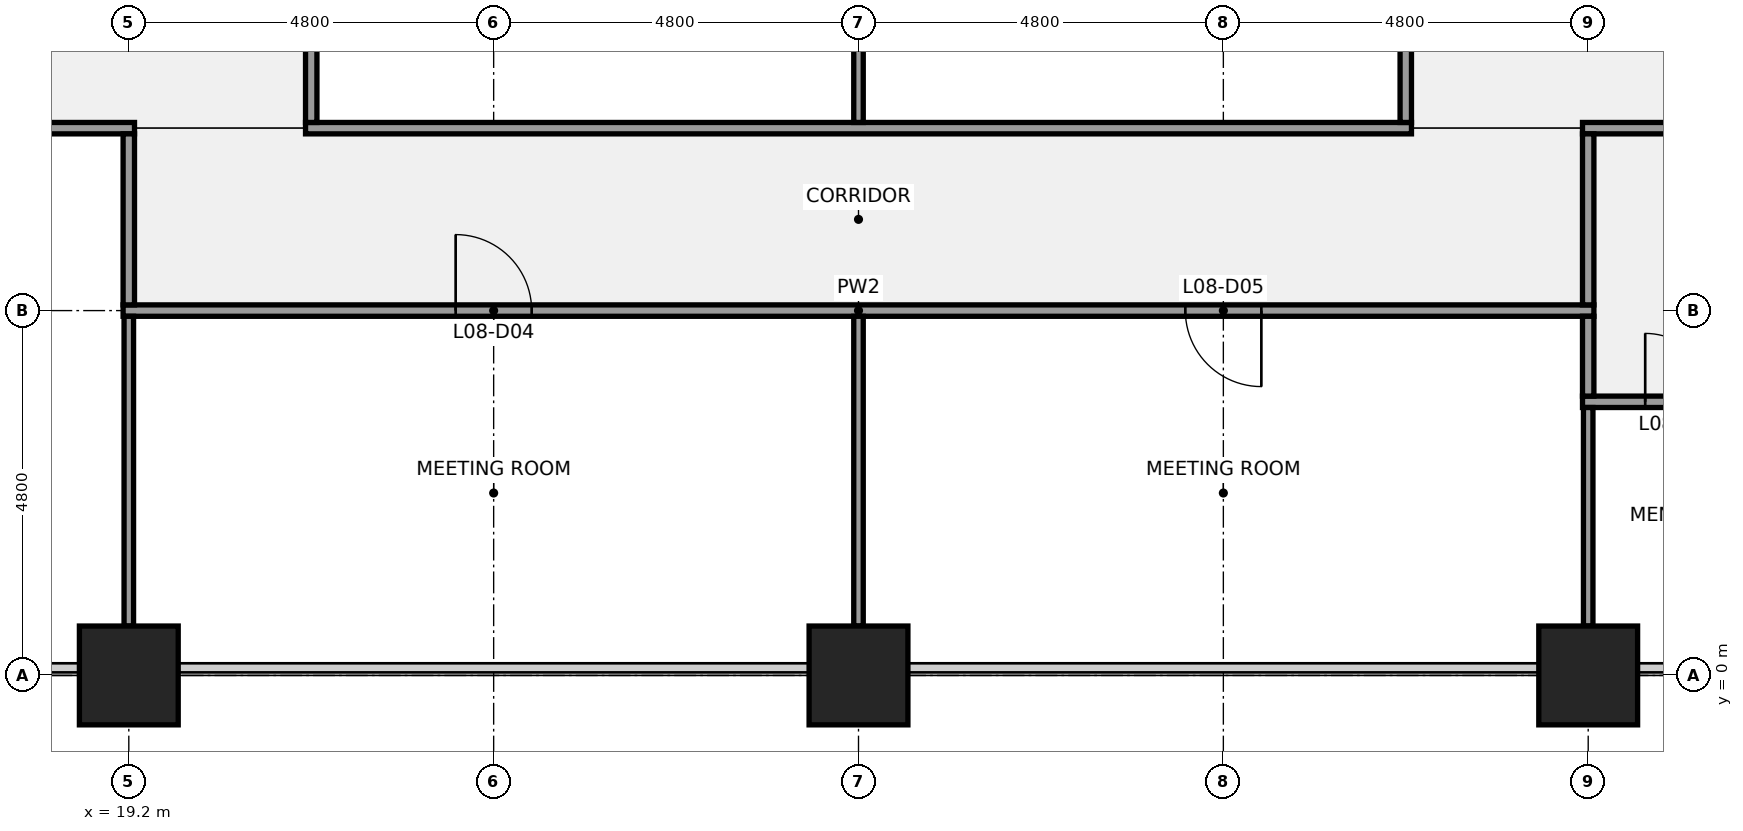
"""IFC4 building model, lengths in metres.
Left out: names, types, materials, properties, quantities, classifications, styles, units other than length and angle.
Written with IfcOpenShell. Run it as: python <this file> out.ifc"""

import sys

from ifc_helpers import new_model, si_unit, direction, frame, frame_2d, origin, origin_2d, place, context, subcontext, project, spatial, rectangle, extrude, element, fill, save


model = new_model("IFC4")
c1 = context("Model", 3, precision=1e-05, world=origin(), true_north=direction((0.0, 1.0)))
c2 = subcontext(c1, "Body", "Model", "MODEL_VIEW")
j1 = project(units=[si_unit("LENGTHUNIT", "METRE"), si_unit("PLANEANGLEUNIT", "RADIAN")], contexts=[c1])
p1 = place(None, origin())
s1 = spatial("IfcSite", under=j1, at=p1, CompositionType="ELEMENT")
p2 = place(p1, origin())
s2 = spatial("IfcBuilding", under=s1, at=p2, CompositionType="ELEMENT")
p3 = place(p2, frame((0.0, 0.0, 43.0)))
s3 = spatial("IfcBuildingStorey", under=s2, at=p3, CompositionType="ELEMENT", Elevation=43.0)
for number, where, z_axis, x_axis in (
    (1, (19.2, 0.0, 0.0), (0.0, 0.0, 1.0), (1.0, 0.0, 0.0)),
    (2, (28.8, 0.0, 0.0), (0.0, 0.0, 1.0), (1.0, 0.0, 0.0)),
    (3, (38.4, 0.0, 0.0), (0.0, 0.0, 1.0), (1.0, 0.0, 0.0)),
):
    element("IfcColumn", number, at=place(p3, frame(where, z_axis=z_axis, x_axis=x_axis)), inside=s3, PredefinedType="COLUMN", context=c2, shape_type="SweptSolid", body=[
        extrude(rectangle(XDim=1.3, YDim=1.3, at=origin_2d()), origin(), (0.0, 0.0, 1.0), 4.0),
    ])
p4 = place(p3, frame((38.325, 3.6, 0.0), z_axis=(0.0, 0.0, 1.0), x_axis=(1.0, 0.0, 0.0)))
e4 = element("IfcWall", 4, at=p4, inside=s3, PredefinedType="PARTITIONING", context=c2, shape_type="SweptSolid", body=[
    extrude(rectangle(XDim=7.35, YDim=0.15, at=frame_2d((3.675, 0.0))), origin(), (0.0, 0.0, 1.0), 2.849),
])
p5 = place(p4, frame((0.825, 0.0, 0.0)))
e5 = element("IfcOpeningElement", 5, at=p5, cuts=e4, PredefinedType="OPENING", context=c2, shape_type="SweptSolid", body=[
    extrude(rectangle(XDim=0.9, YDim=2.1, at=frame_2d((0.45, 1.05))), frame((0.0, 0.085, 0.0), z_axis=(0.0, -1.0, 0.0), x_axis=(1.0, 0.0, 0.0)), (0.0, 0.0, 1.0), 0.17),
])
p6 = place(p4, frame((3.225, 0.0, 0.0)))
e6 = element("IfcOpeningElement", 6, at=p6, cuts=e4, PredefinedType="OPENING", context=c2, shape_type="SweptSolid", body=[
    extrude(rectangle(XDim=0.9, YDim=2.1, at=frame_2d((0.45, 1.05))), frame((0.0, 0.085, 0.0), z_axis=(0.0, -1.0, 0.0), x_axis=(1.0, 0.0, 0.0)), (0.0, 0.0, 1.0), 0.17),
])
p7 = place(p4, frame((5.475, 0.0, 0.0)))
e7 = element("IfcOpeningElement", 7, at=p7, cuts=e4, PredefinedType="OPENING", context=c2, shape_type="SweptSolid", body=[
    extrude(rectangle(XDim=1.2, YDim=2.1, at=frame_2d((0.6, 1.05))), frame((0.0, 0.085, 0.0), z_axis=(0.0, -1.0, 0.0), x_axis=(1.0, 0.0, 0.0)), (0.0, 0.0, 1.0), 0.17),
])
p8 = place(p3, frame((19.125, 4.8, 0.0), z_axis=(0.0, 0.0, 1.0), x_axis=(1.0, 0.0, 0.0)))
e8 = element("IfcWall", 8, at=p8, inside=s3, PredefinedType="PARTITIONING", context=c2, shape_type="SweptSolid", body=[
    extrude(rectangle(XDim=19.35, YDim=0.15, at=frame_2d((9.675, 0.0))), origin(), (0.0, 0.0, 1.0), 2.849),
])
p9 = place(p8, frame((4.375, 0.0, 0.0)))
e9 = element("IfcOpeningElement", 9, at=p9, cuts=e8, PredefinedType="OPENING", context=c2, shape_type="SweptSolid", body=[
    extrude(rectangle(XDim=1.0, YDim=2.1, at=frame_2d((0.5, 1.05))), frame((0.0, 0.085, 0.0), z_axis=(0.0, -1.0, 0.0), x_axis=(1.0, 0.0, 0.0)), (0.0, 0.0, 1.0), 0.17),
])
p10 = place(p8, frame((13.975, 0.0, 0.0)))
e10 = element("IfcOpeningElement", 10, at=p10, cuts=e8, PredefinedType="OPENING", context=c2, shape_type="SweptSolid", body=[
    extrude(rectangle(XDim=1.0, YDim=2.1, at=frame_2d((0.5, 1.05))), frame((0.0, 0.085, 0.0), z_axis=(0.0, -1.0, 0.0), x_axis=(1.0, 0.0, 0.0)), (0.0, 0.0, 1.0), 0.17),
])
p11 = place(p3, frame((14.325, 7.2, 0.0), z_axis=(0.0, 0.0, 1.0), x_axis=(1.0, 0.0, 0.0)))
e11 = element("IfcWall", 11, at=p11, inside=s3, PredefinedType="PARTITIONING", context=c2, shape_type="SweptSolid", body=[
    extrude(rectangle(XDim=4.95, YDim=0.15, at=frame_2d((2.475, 0.0))), origin(), (0.0, 0.0, 1.0), 2.849),
])
p12 = place(p11, frame((1.975, 0.0, 0.0)))
e12 = element("IfcOpeningElement", 12, at=p12, cuts=e11, PredefinedType="OPENING", context=c2, shape_type="SweptSolid", body=[
    extrude(rectangle(XDim=1.0, YDim=2.1, at=frame_2d((0.5, 1.05))), frame((0.0, 0.085, 0.0), z_axis=(0.0, -1.0, 0.0), x_axis=(1.0, 0.0, 0.0)), (0.0, 0.0, 1.0), 0.17),
])
p13 = place(p3, frame((21.525, 7.2, 0.0), z_axis=(0.0, 0.0, 1.0), x_axis=(1.0, 0.0, 0.0)))
e13 = element("IfcWall", 13, at=p13, inside=s3, PredefinedType="PARTITIONING", context=c2, shape_type="SweptSolid", body=[
    extrude(rectangle(XDim=14.55, YDim=0.15, at=frame_2d((7.275, 0.0))), origin(), (0.0, 0.0, 1.0), 2.849),
])
p14 = place(p3, frame((38.325, 7.2, 0.0), z_axis=(0.0, 0.0, 1.0), x_axis=(1.0, 0.0, 0.0)))
e14 = element("IfcWall", 14, at=p14, inside=s3, PredefinedType="PARTITIONING", context=c2, shape_type="SweptSolid", body=[
    extrude(rectangle(XDim=7.35, YDim=0.15, at=frame_2d((3.675, 0.0))), origin(), (0.0, 0.0, 1.0), 2.849),
])
p15 = place(p14, frame((1.975, 0.0, 0.0)))
e15 = element("IfcOpeningElement", 15, at=p15, cuts=e14, PredefinedType="OPENING", context=c2, shape_type="SweptSolid", body=[
    extrude(rectangle(XDim=1.0, YDim=2.1, at=frame_2d((0.5, 1.05))), frame((0.0, 0.085, 0.0), z_axis=(0.0, -1.0, 0.0), x_axis=(1.0, 0.0, 0.0)), (0.0, 0.0, 1.0), 0.17),
])
p16 = place(p3, frame((19.2, 0.65, 0.0), z_axis=(0.0, 0.0, 1.0), x_axis=(0.0, 1.0, 0.0)))
e16 = element("IfcWall", 16, at=p16, inside=s3, PredefinedType="PARTITIONING", context=c2, shape_type="SweptSolid", body=[
    extrude(rectangle(XDim=4.075, YDim=0.125, at=frame_2d((2.038, 0.0))), origin(), (0.0, 0.0, 1.0), 2.849),
])
p17 = place(p3, frame((19.2, 4.875, 0.0), z_axis=(0.0, 0.0, 1.0), x_axis=(0.0, 1.0, 0.0)))
e17 = element("IfcWall", 17, at=p17, inside=s3, PredefinedType="PARTITIONING", context=c2, shape_type="SweptSolid", body=[
    extrude(rectangle(XDim=2.25, YDim=0.15, at=frame_2d((1.125, 0.0))), origin(), (0.0, 0.0, 1.0), 2.849),
])
p18 = place(p3, frame((21.6, 7.275, 0.0), z_axis=(0.0, 0.0, 1.0), x_axis=(0.0, 1.0, 0.0)))
e18 = element("IfcWall", 18, at=p18, inside=s3, PredefinedType="PARTITIONING", context=c2, shape_type="SweptSolid", body=[
    extrude(rectangle(XDim=7.062, YDim=0.15, at=frame_2d((3.531, 0.0))), origin(), (0.0, 0.0, 1.0), 2.849),
])
p19 = place(p18, frame((3.031, 0.0, 0.0)))
e19 = element("IfcOpeningElement", 19, at=p19, cuts=e18, PredefinedType="OPENING", context=c2, shape_type="SweptSolid", body=[
    extrude(rectangle(XDim=1.0, YDim=2.1, at=frame_2d((0.5, 1.05))), frame((0.0, 0.085, 0.0), z_axis=(0.0, -1.0, 0.0), x_axis=(1.0, 0.0, 0.0)), (0.0, 0.0, 1.0), 0.17),
])
p20 = place(p3, frame((28.8, 0.65, 0.0), z_axis=(0.0, 0.0, 1.0), x_axis=(0.0, 1.0, 0.0)))
e20 = element("IfcWall", 20, at=p20, inside=s3, PredefinedType="PARTITIONING", context=c2, shape_type="SweptSolid", body=[
    extrude(rectangle(XDim=4.075, YDim=0.125, at=frame_2d((2.038, 0.0))), origin(), (0.0, 0.0, 1.0), 2.849),
])
p21 = place(p3, frame((28.8, 7.275, 0.0), z_axis=(0.0, 0.0, 1.0), x_axis=(0.0, 1.0, 0.0)))
e21 = element("IfcWall", 21, at=p21, inside=s3, PredefinedType="PARTITIONING", context=c2, shape_type="SweptSolid", body=[
    extrude(rectangle(XDim=7.062, YDim=0.125, at=frame_2d((3.531, 0.0))), origin(), (0.0, 0.0, 1.0), 2.849),
])
p22 = place(p3, frame((36.0, 7.275, 0.0), z_axis=(0.0, 0.0, 1.0), x_axis=(0.0, 1.0, 0.0)))
e22 = element("IfcWall", 22, at=p22, inside=s3, PredefinedType="PARTITIONING", context=c2, shape_type="SweptSolid", body=[
    extrude(rectangle(XDim=7.062, YDim=0.15, at=frame_2d((3.531, 0.0))), origin(), (0.0, 0.0, 1.0), 2.849),
])
p23 = place(p22, frame((3.031, 0.0, 0.0)))
e23 = element("IfcOpeningElement", 23, at=p23, cuts=e22, PredefinedType="OPENING", context=c2, shape_type="SweptSolid", body=[
    extrude(rectangle(XDim=1.0, YDim=2.1, at=frame_2d((0.5, 1.05))), frame((0.0, 0.085, 0.0), z_axis=(0.0, -1.0, 0.0), x_axis=(1.0, 0.0, 0.0)), (0.0, 0.0, 1.0), 0.17),
])
p24 = place(p3, frame((38.4, 0.65, 0.0), z_axis=(0.0, 0.0, 1.0), x_axis=(0.0, 1.0, 0.0)))
e24 = element("IfcWall", 24, at=p24, inside=s3, PredefinedType="PARTITIONING", context=c2, shape_type="SweptSolid", body=[
    extrude(rectangle(XDim=2.875, YDim=0.125, at=frame_2d((1.438, 0.0))), origin(), (0.0, 0.0, 1.0), 2.849),
])
p25 = place(p3, frame((38.4, 3.675, 0.0), z_axis=(0.0, 0.0, 1.0), x_axis=(0.0, 1.0, 0.0)))
e25 = element("IfcWall", 25, at=p25, inside=s3, PredefinedType="PARTITIONING", context=c2, shape_type="SweptSolid", body=[
    extrude(rectangle(XDim=1.05, YDim=0.15, at=frame_2d((0.525, 0.0))), origin(), (0.0, 0.0, 1.0), 2.849),
])
p26 = place(p3, frame((38.4, 4.875, 0.0), z_axis=(0.0, 0.0, 1.0), x_axis=(0.0, 1.0, 0.0)))
e26 = element("IfcWall", 26, at=p26, inside=s3, PredefinedType="PARTITIONING", context=c2, shape_type="SweptSolid", body=[
    extrude(rectangle(XDim=2.25, YDim=0.15, at=frame_2d((1.125, 0.0))), origin(), (0.0, 0.0, 1.0), 2.849),
])
for number, where, z_axis, x_axis in (
    (27, (19.2, -1.075, 0.0), (0.0, 0.0, 1.0), (1.0, 0.0, 0.0)),
    (28, (38.4, -1.075, 0.0), (0.0, 0.0, 1.0), (1.0, 0.0, 0.0)),
):
    element("IfcColumn", number, at=place(p3, frame(where, z_axis=z_axis, x_axis=x_axis)), inside=s3, PredefinedType="PILASTER", context=c2, shape_type="SweptSolid", body=[
        extrude(rectangle(XDim=4.2, YDim=0.85, at=origin_2d()), origin(), (0.0, 0.0, 1.0), 4.0),
    ])
p27 = place(p5, origin())
e29 = element("IfcDoor", 29, at=p27, inside=s3, OperationType="SINGLE_SWING_LEFT", PredefinedType="DOOR", context=c2, shape_type="SweptSolid", body=[
    extrude(rectangle(XDim=0.9, YDim=2.1, at=frame_2d((0.45, 1.05))), frame((0.0, 0.025, 0.0), z_axis=(0.0, -1.0, 0.0), x_axis=(1.0, 0.0, 0.0)), (0.0, 0.0, 1.0), 0.05),
])
fill(e5, e29)
p28 = place(p9, origin())
e30 = element("IfcDoor", 30, at=p28, inside=s3, OperationType="SINGLE_SWING_LEFT", PredefinedType="DOOR", context=c2, shape_type="SweptSolid", body=[
    extrude(rectangle(XDim=1.0, YDim=2.1, at=frame_2d((0.5, 1.05))), frame((0.0, 0.025, 0.0), z_axis=(0.0, -1.0, 0.0), x_axis=(1.0, 0.0, 0.0)), (0.0, 0.0, 1.0), 0.05),
])
fill(e9, e30)
p29 = place(p10, origin())
e31 = element("IfcDoor", 31, at=p29, inside=s3, OperationType="SINGLE_SWING_RIGHT", PredefinedType="DOOR", context=c2, shape_type="SweptSolid", body=[
    extrude(rectangle(XDim=1.0, YDim=2.1, at=frame_2d((0.5, 1.05))), frame((0.0, 0.025, 0.0), z_axis=(0.0, -1.0, 0.0), x_axis=(1.0, 0.0, 0.0)), (0.0, 0.0, 1.0), 0.05),
])
fill(e10, e31)
save(model, sys.argv[1])
